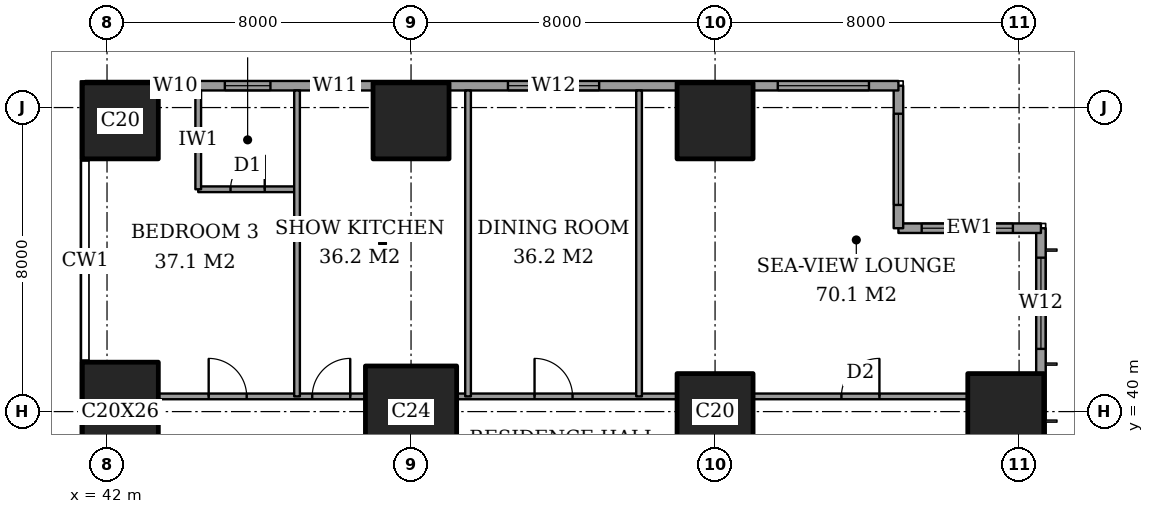
"""IFC4 building model, lengths in metres.
Left out: names, types, materials, properties, quantities, classifications, styles, units other than length and angle.
Written with IfcOpenShell. Run it as: python <this file> out.ifc"""

import sys

from ifc_helpers import new_model, si_unit, direction, frame, frame_2d, origin, origin_2d, place, context, subcontext, project, spatial, rectangle, extrude, element, fill, save


model = new_model("IFC4")
c1 = context("Model", 3, precision=1e-05, world=origin(), true_north=direction((0.0, 1.0)))
c2 = subcontext(c1, "Body", "Model", "MODEL_VIEW")
j1 = project(units=[si_unit("LENGTHUNIT", "METRE"), si_unit("PLANEANGLEUNIT", "RADIAN")], contexts=[c1])
p1 = place(None, origin())
s1 = spatial("IfcSite", under=j1, at=p1, CompositionType="ELEMENT")
p2 = place(p1, origin())
s2 = spatial("IfcBuilding", under=s1, at=p2, CompositionType="ELEMENT")
p3 = place(p2, frame((0.0, 0.0, 128.6)))
s3 = spatial("IfcBuildingStorey", under=s2, at=p3, CompositionType="ELEMENT", Elevation=128.6)
p4 = place(p3, frame((42.35, 40.0, 0.0), z_axis=(0.0, 0.0, 1.0), x_axis=(1.0, 0.0, 0.0)))
e1 = element("IfcColumn", 1, at=p4, inside=s3, PredefinedType="COLUMN", context=c2, shape_type="SweptSolid", body=[
    extrude(rectangle(XDim=2.0, YDim=2.6, at=origin_2d()), origin(), (0.0, 0.0, 1.0), 3.6),
])
p5 = place(p3, frame((42.35, 47.65, 0.0), z_axis=(0.0, 0.0, 1.0), x_axis=(1.0, 0.0, 0.0)))
e2 = element("IfcColumn", 2, at=p5, inside=s3, PredefinedType="COLUMN", context=c2, shape_type="SweptSolid", body=[
    extrude(rectangle(XDim=2.0, YDim=2.0, at=origin_2d()), origin(), (0.0, 0.0, 1.0), 3.6),
])
p6 = place(p3, frame((50.0, 40.0, 0.0), z_axis=(0.0, 0.0, 1.0), x_axis=(1.0, 0.0, 0.0)))
e3 = element("IfcColumn", 3, at=p6, inside=s3, PredefinedType="COLUMN", context=c2, shape_type="SweptSolid", body=[
    extrude(rectangle(XDim=2.4, YDim=2.4, at=origin_2d()), origin(), (0.0, 0.0, 1.0), 3.6),
])
for number, where, z_axis, x_axis in (
    (4, (50.0, 47.65, 0.0), (0.0, 0.0, 1.0), (1.0, 0.0, 0.0)),
    (5, (58.0, 40.0, 0.0), (0.0, 0.0, 1.0), (1.0, 0.0, 0.0)),
    (6, (58.0, 47.65, 0.0), (0.0, 0.0, 1.0), (1.0, 0.0, 0.0)),
    (7, (65.65, 40.0, 0.0), (0.0, 0.0, 1.0), (1.0, 0.0, 0.0)),
):
    element("IfcColumn", number, at=place(p3, frame(where, z_axis=z_axis, x_axis=x_axis)), inside=s3, PredefinedType="COLUMN", context=c2, shape_type="SweptSolid", body=[
        extrude(rectangle(XDim=2.0, YDim=2.0, at=origin_2d()), origin(), (0.0, 0.0, 1.0), 3.6),
    ])
p7 = place(p3, frame((66.575, 3.175, 0.0), z_axis=(0.0, 0.0, 1.0), x_axis=(0.0, 1.0, 0.0)))
e8 = element("IfcWall", 8, at=p7, inside=s3, PredefinedType="SOLIDWALL", context=c2, shape_type="SweptSolid", body=[
    extrude(rectangle(XDim=41.65, YDim=0.25, at=frame_2d((20.825, 0.0))), origin(), (0.0, 0.0, 1.0), 3.6),
])
p8 = place(p7, frame((0.775, 0.0, 0.4)))
e9 = element("IfcOpeningElement", 9, at=p8, cuts=e8, PredefinedType="OPENING", context=c2, shape_type="SweptSolid", body=[
    extrude(rectangle(XDim=2.4, YDim=2.2, at=frame_2d((1.2, 1.1))), frame((0.0, 0.135, 0.0), z_axis=(0.0, -1.0, 0.0), x_axis=(1.0, 0.0, 0.0)), (0.0, 0.0, 1.0), 0.27),
])
p9 = place(p7, frame((6.125, 0.0, 0.4)))
e10 = element("IfcOpeningElement", 10, at=p9, cuts=e8, PredefinedType="OPENING", context=c2, shape_type="SweptSolid", body=[
    extrude(rectangle(XDim=1.2, YDim=2.2, at=frame_2d((0.6, 1.1))), frame((0.0, 0.135, 0.0), z_axis=(0.0, -1.0, 0.0), x_axis=(1.0, 0.0, 0.0)), (0.0, 0.0, 1.0), 0.27),
])
p10 = place(p7, frame((8.375, 0.0, 0.4)))
e11 = element("IfcOpeningElement", 11, at=p10, cuts=e8, PredefinedType="OPENING", context=c2, shape_type="SweptSolid", body=[
    extrude(rectangle(XDim=2.4, YDim=2.2, at=frame_2d((1.2, 1.1))), frame((0.0, 0.135, 0.0), z_axis=(0.0, -1.0, 0.0), x_axis=(1.0, 0.0, 0.0)), (0.0, 0.0, 1.0), 0.27),
])
p11 = place(p7, frame((15.775, 0.0, 0.4)))
e12 = element("IfcOpeningElement", 12, at=p11, cuts=e8, PredefinedType="OPENING", context=c2, shape_type="SweptSolid", body=[
    extrude(rectangle(XDim=2.4, YDim=2.2, at=frame_2d((1.2, 1.1))), frame((0.0, 0.135, 0.0), z_axis=(0.0, -1.0, 0.0), x_axis=(1.0, 0.0, 0.0)), (0.0, 0.0, 1.0), 0.27),
])
p12 = place(p7, frame((23.475, 0.0, 0.4)))
e13 = element("IfcOpeningElement", 13, at=p12, cuts=e8, PredefinedType="OPENING", context=c2, shape_type="SweptSolid", body=[
    extrude(rectangle(XDim=2.4, YDim=2.2, at=frame_2d((1.2, 1.1))), frame((0.0, 0.135, 0.0), z_axis=(0.0, -1.0, 0.0), x_axis=(1.0, 0.0, 0.0)), (0.0, 0.0, 1.0), 0.27),
])
p13 = place(p7, frame((30.975, 0.0, 0.4)))
e14 = element("IfcOpeningElement", 14, at=p13, cuts=e8, PredefinedType="OPENING", context=c2, shape_type="SweptSolid", body=[
    extrude(rectangle(XDim=2.4, YDim=2.2, at=frame_2d((1.2, 1.1))), frame((0.0, 0.135, 0.0), z_axis=(0.0, -1.0, 0.0), x_axis=(1.0, 0.0, 0.0)), (0.0, 0.0, 1.0), 0.27),
])
p14 = place(p7, frame((34.5, 0.0, 0.4)))
e15 = element("IfcOpeningElement", 15, at=p14, cuts=e8, PredefinedType="OPENING", context=c2, shape_type="SweptSolid", body=[
    extrude(rectangle(XDim=1.2, YDim=2.2, at=frame_2d((0.6, 1.1))), frame((0.0, 0.135, 0.0), z_axis=(0.0, -1.0, 0.0), x_axis=(1.0, 0.0, 0.0)), (0.0, 0.0, 1.0), 0.27),
])
p15 = place(p7, frame((38.475, 0.0, 0.4)))
e16 = element("IfcOpeningElement", 16, at=p15, cuts=e8, PredefinedType="OPENING", context=c2, shape_type="SweptSolid", body=[
    extrude(rectangle(XDim=2.4, YDim=2.2, at=frame_2d((1.2, 1.1))), frame((0.0, 0.135, 0.0), z_axis=(0.0, -1.0, 0.0), x_axis=(1.0, 0.0, 0.0)), (0.0, 0.0, 1.0), 0.27),
])
p16 = place(p3, frame((66.575, 44.825, 0.0), z_axis=(0.0, 0.0, 1.0), x_axis=(-1.0, 0.0, 0.0)))
e17 = element("IfcWall", 17, at=p16, inside=s3, PredefinedType="SOLIDWALL", context=c2, shape_type="SweptSolid", body=[
    extrude(rectangle(XDim=3.75, YDim=0.25, at=frame_2d((1.875, 0.0))), origin(), (0.0, 0.0, 1.0), 3.6),
])
p17 = place(p16, frame((0.738, 0.0, 0.4)))
e18 = element("IfcOpeningElement", 18, at=p17, cuts=e17, PredefinedType="OPENING", context=c2, shape_type="SweptSolid", body=[
    extrude(rectangle(XDim=2.4, YDim=2.2, at=frame_2d((1.2, 1.1))), frame((0.0, 0.135, 0.0), z_axis=(0.0, -1.0, 0.0), x_axis=(1.0, 0.0, 0.0)), (0.0, 0.0, 1.0), 0.27),
])
p18 = place(p3, frame((62.825, 44.825, 0.0), z_axis=(0.0, 0.0, 1.0), x_axis=(0.0, 1.0, 0.0)))
e19 = element("IfcWall", 19, at=p18, inside=s3, PredefinedType="SOLIDWALL", context=c2, shape_type="SweptSolid", body=[
    extrude(rectangle(XDim=3.75, YDim=0.25, at=frame_2d((1.875, 0.0))), origin(), (0.0, 0.0, 1.0), 3.6),
])
p19 = place(p18, frame((0.613, 0.0, 0.4)))
e20 = element("IfcOpeningElement", 20, at=p19, cuts=e19, PredefinedType="OPENING", context=c2, shape_type="SweptSolid", body=[
    extrude(rectangle(XDim=2.4, YDim=2.2, at=frame_2d((1.2, 1.1))), frame((0.0, 0.135, 0.0), z_axis=(0.0, -1.0, 0.0), x_axis=(1.0, 0.0, 0.0)), (0.0, 0.0, 1.0), 0.27),
])
p20 = place(p3, frame((62.825, 48.575, 0.0), z_axis=(0.0, 0.0, 1.0), x_axis=(-1.0, 0.0, 0.0)))
e21 = element("IfcWall", 21, at=p20, inside=s3, PredefinedType="SOLIDWALL", context=c2, shape_type="SweptSolid", body=[
    extrude(rectangle(XDim=21.4, YDim=0.25, at=frame_2d((10.7, 0.0))), origin(), (0.0, 0.0, 1.0), 3.6),
])
p21 = place(p20, frame((0.775, 0.0, 0.4)))
e22 = element("IfcOpeningElement", 22, at=p21, cuts=e21, PredefinedType="OPENING", context=c2, shape_type="SweptSolid", body=[
    extrude(rectangle(XDim=2.4, YDim=2.2, at=frame_2d((1.2, 1.1))), frame((0.0, 0.135, 0.0), z_axis=(0.0, -1.0, 0.0), x_axis=(1.0, 0.0, 0.0)), (0.0, 0.0, 1.0), 0.27),
])
p22 = place(p20, frame((7.875, 0.0, 0.4)))
e23 = element("IfcOpeningElement", 23, at=p22, cuts=e21, PredefinedType="OPENING", context=c2, shape_type="SweptSolid", body=[
    extrude(rectangle(XDim=2.4, YDim=2.2, at=frame_2d((1.2, 1.1))), frame((0.0, 0.135, 0.0), z_axis=(0.0, -1.0, 0.0), x_axis=(1.0, 0.0, 0.0)), (0.0, 0.0, 1.0), 0.27),
])
p23 = place(p20, frame((14.225, 0.0, 0.4)))
e24 = element("IfcOpeningElement", 24, at=p23, cuts=e21, PredefinedType="OPENING", context=c2, shape_type="SweptSolid", body=[
    extrude(rectangle(XDim=1.2, YDim=2.2, at=frame_2d((0.6, 1.1))), frame((0.0, 0.135, 0.0), z_axis=(0.0, -1.0, 0.0), x_axis=(1.0, 0.0, 0.0)), (0.0, 0.0, 1.0), 0.27),
])
p24 = place(p20, frame((16.525, 0.0, 0.4)))
e25 = element("IfcOpeningElement", 25, at=p24, cuts=e21, PredefinedType="OPENING", context=c2, shape_type="SweptSolid", body=[
    extrude(rectangle(XDim=1.2, YDim=2.2, at=frame_2d((0.6, 1.1))), frame((0.0, 0.135, 0.0), z_axis=(0.0, -1.0, 0.0), x_axis=(1.0, 0.0, 0.0)), (0.0, 0.0, 1.0), 0.27),
])
p25 = place(p20, frame((18.725, 0.0, 0.4)))
e26 = element("IfcOpeningElement", 26, at=p25, cuts=e21, PredefinedType="OPENING", context=c2, shape_type="SweptSolid", body=[
    extrude(rectangle(XDim=0.6, YDim=2.2, at=frame_2d((0.3, 1.1))), frame((0.0, 0.135, 0.0), z_axis=(0.0, -1.0, 0.0), x_axis=(1.0, 0.0, 0.0)), (0.0, 0.0, 1.0), 0.27),
])
p26 = place(p3, frame((43.35, 40.4, 0.0), z_axis=(0.0, 0.0, 1.0), x_axis=(1.0, 0.0, 0.0)))
e27 = element("IfcWall", 27, at=p26, inside=s3, PredefinedType="PARTITIONING", context=c2, shape_type="SweptSolid", body=[
    extrude(rectangle(XDim=5.45, YDim=0.15, at=frame_2d((2.725, 0.0))), origin(), (0.0, 0.0, 1.0), 3.35),
])
p27 = place(p26, frame((4.05, 0.0, 0.0)))
e28 = element("IfcOpeningElement", 28, at=p27, cuts=e27, PredefinedType="OPENING", context=c2, shape_type="SweptSolid", body=[
    extrude(rectangle(XDim=1.0, YDim=2.1, at=frame_2d((0.5, 1.05))), frame((0.0, 0.085, 0.0), z_axis=(0.0, -1.0, 0.0), x_axis=(1.0, 0.0, 0.0)), (0.0, 0.0, 1.0), 0.17),
])
p28 = place(p26, frame((1.325, 0.0, 0.0)))
e29 = element("IfcOpeningElement", 29, at=p28, cuts=e27, PredefinedType="OPENING", context=c2, shape_type="SweptSolid", body=[
    extrude(rectangle(XDim=1.0, YDim=2.1, at=frame_2d((0.5, 1.05))), frame((0.0, 0.085, 0.0), z_axis=(0.0, -1.0, 0.0), x_axis=(1.0, 0.0, 0.0)), (0.0, 0.0, 1.0), 0.17),
])
p29 = place(p3, frame((51.2, 40.4, 0.0), z_axis=(0.0, 0.0, 1.0), x_axis=(1.0, 0.0, 0.0)))
e30 = element("IfcWall", 30, at=p29, inside=s3, PredefinedType="PARTITIONING", context=c2, shape_type="SweptSolid", body=[
    extrude(rectangle(XDim=5.8, YDim=0.15, at=frame_2d((2.9, 0.0))), origin(), (0.0, 0.0, 1.0), 3.35),
])
p30 = place(p29, frame((2.05, 0.0, 0.0)))
e31 = element("IfcOpeningElement", 31, at=p30, cuts=e30, PredefinedType="OPENING", context=c2, shape_type="SweptSolid", body=[
    extrude(rectangle(XDim=1.0, YDim=2.1, at=frame_2d((0.5, 1.05))), frame((0.0, 0.085, 0.0), z_axis=(0.0, -1.0, 0.0), x_axis=(1.0, 0.0, 0.0)), (0.0, 0.0, 1.0), 0.17),
])
p31 = place(p3, frame((59.0, 40.4, 0.0), z_axis=(0.0, 0.0, 1.0), x_axis=(1.0, 0.0, 0.0)))
e32 = element("IfcWall", 32, at=p31, inside=s3, PredefinedType="PARTITIONING", context=c2, shape_type="SweptSolid", body=[
    extrude(rectangle(XDim=5.65, YDim=0.15, at=frame_2d((2.825, 0.0))), origin(), (0.0, 0.0, 1.0), 3.35),
])
p32 = place(p31, frame((2.325, 0.0, 0.0)))
e33 = element("IfcOpeningElement", 33, at=p32, cuts=e32, PredefinedType="OPENING", context=c2, shape_type="SweptSolid", body=[
    extrude(rectangle(XDim=1.0, YDim=2.1, at=frame_2d((0.5, 1.05))), frame((0.0, 0.085, 0.0), z_axis=(0.0, -1.0, 0.0), x_axis=(1.0, 0.0, 0.0)), (0.0, 0.0, 1.0), 0.17),
])
p33 = place(p3, frame((44.4, 45.85, 0.0), z_axis=(0.0, 0.0, 1.0), x_axis=(1.0, 0.0, 0.0)))
e34 = element("IfcWall", 34, at=p33, inside=s3, PredefinedType="PARTITIONING", context=c2, shape_type="SweptSolid", body=[
    extrude(rectangle(XDim=2.6, YDim=0.15, at=frame_2d((1.3, 0.0))), origin(), (0.0, 0.0, 1.0), 3.35),
])
p34 = place(p33, frame((0.85, 0.0, 0.0)))
e35 = element("IfcOpeningElement", 35, at=p34, cuts=e34, PredefinedType="OPENING", context=c2, shape_type="SweptSolid", body=[
    extrude(rectangle(XDim=0.9, YDim=2.1, at=frame_2d((0.45, 1.05))), frame((0.0, 0.085, 0.0), z_axis=(0.0, -1.0, 0.0), x_axis=(1.0, 0.0, 0.0)), (0.0, 0.0, 1.0), 0.17),
])
p35 = place(p3, frame((44.4, 45.85, 0.0), z_axis=(0.0, 0.0, 1.0), x_axis=(0.0, 1.0, 0.0)))
e36 = element("IfcWall", 36, at=p35, inside=s3, PredefinedType="PARTITIONING", context=c2, shape_type="SweptSolid", body=[
    extrude(rectangle(XDim=2.6, YDim=0.15, at=frame_2d((1.3, 0.0))), origin(), (0.0, 0.0, 1.0), 3.35),
])
for number, where, z_axis, x_axis in (
    (37, (47.0, 40.4, 0.0), (0.0, 0.0, 1.0), (0.0, 1.0, 0.0)),
    (38, (51.5, 40.4, 0.0), (0.0, 0.0, 1.0), (0.0, 1.0, 0.0)),
    (39, (56.0, 40.4, 0.0), (0.0, 0.0, 1.0), (0.0, 1.0, 0.0)),
):
    element("IfcWall", number, at=place(p3, frame(where, z_axis=z_axis, x_axis=x_axis)), inside=s3, PredefinedType="PARTITIONING", context=c2, shape_type="SweptSolid", body=[
        extrude(rectangle(XDim=8.05, YDim=0.15, at=frame_2d((4.025, 0.0))), origin(), (0.0, 0.0, 1.0), 3.35),
    ])
p36 = place(p15, origin())
e40 = element("IfcWindow", 40, at=p36, inside=s3, PartitioningType="SINGLE_PANEL", PredefinedType="WINDOW", context=c2, shape_type="SweptSolid", body=[
    extrude(rectangle(XDim=2.4, YDim=2.2, at=frame_2d((1.2, 1.1))), frame((0.0, 0.03, 0.0), z_axis=(0.0, -1.0, 0.0), x_axis=(1.0, 0.0, 0.0)), (0.0, 0.0, 1.0), 0.06),
])
fill(e16, e40)
p37 = place(p17, origin())
e41 = element("IfcWindow", 41, at=p37, inside=s3, PartitioningType="SINGLE_PANEL", PredefinedType="WINDOW", context=c2, shape_type="SweptSolid", body=[
    extrude(rectangle(XDim=2.4, YDim=2.2, at=frame_2d((1.2, 1.1))), frame((0.0, 0.03, 0.0), z_axis=(0.0, -1.0, 0.0), x_axis=(1.0, 0.0, 0.0)), (0.0, 0.0, 1.0), 0.06),
])
fill(e18, e41)
p38 = place(p19, origin())
e42 = element("IfcWindow", 42, at=p38, inside=s3, PartitioningType="SINGLE_PANEL", PredefinedType="WINDOW", context=c2, shape_type="SweptSolid", body=[
    extrude(rectangle(XDim=2.4, YDim=2.2, at=frame_2d((1.2, 1.1))), frame((0.0, 0.03, 0.0), z_axis=(0.0, -1.0, 0.0), x_axis=(1.0, 0.0, 0.0)), (0.0, 0.0, 1.0), 0.06),
])
fill(e20, e42)
p39 = place(p21, origin())
e43 = element("IfcWindow", 43, at=p39, inside=s3, PartitioningType="SINGLE_PANEL", PredefinedType="WINDOW", context=c2, shape_type="SweptSolid", body=[
    extrude(rectangle(XDim=2.4, YDim=2.2, at=frame_2d((1.2, 1.1))), frame((0.0, 0.03, 0.0), z_axis=(0.0, -1.0, 0.0), x_axis=(1.0, 0.0, 0.0)), (0.0, 0.0, 1.0), 0.06),
])
fill(e22, e43)
p40 = place(p22, origin())
e44 = element("IfcWindow", 44, at=p40, inside=s3, PartitioningType="SINGLE_PANEL", PredefinedType="WINDOW", context=c2, shape_type="SweptSolid", body=[
    extrude(rectangle(XDim=2.4, YDim=2.2, at=frame_2d((1.2, 1.1))), frame((0.0, 0.03, 0.0), z_axis=(0.0, -1.0, 0.0), x_axis=(1.0, 0.0, 0.0)), (0.0, 0.0, 1.0), 0.06),
])
fill(e23, e44)
p41 = place(p23, origin())
e45 = element("IfcWindow", 45, at=p41, inside=s3, PartitioningType="SINGLE_PANEL", PredefinedType="WINDOW", context=c2, shape_type="SweptSolid", body=[
    extrude(rectangle(XDim=1.2, YDim=2.2, at=frame_2d((0.6, 1.1))), frame((0.0, 0.03, 0.0), z_axis=(0.0, -1.0, 0.0), x_axis=(1.0, 0.0, 0.0)), (0.0, 0.0, 1.0), 0.06),
])
fill(e24, e45)
p42 = place(p24, origin())
e46 = element("IfcWindow", 46, at=p42, inside=s3, PartitioningType="SINGLE_PANEL", PredefinedType="WINDOW", context=c2, shape_type="SweptSolid", body=[
    extrude(rectangle(XDim=1.2, YDim=2.2, at=frame_2d((0.6, 1.1))), frame((0.0, 0.03, 0.0), z_axis=(0.0, -1.0, 0.0), x_axis=(1.0, 0.0, 0.0)), (0.0, 0.0, 1.0), 0.06),
])
fill(e25, e46)
p43 = place(p25, origin())
e47 = element("IfcWindow", 47, at=p43, inside=s3, PartitioningType="SINGLE_PANEL", PredefinedType="WINDOW", context=c2, shape_type="SweptSolid", body=[
    extrude(rectangle(XDim=0.6, YDim=2.2, at=frame_2d((0.3, 1.1))), frame((0.0, 0.03, 0.0), z_axis=(0.0, -1.0, 0.0), x_axis=(1.0, 0.0, 0.0)), (0.0, 0.0, 1.0), 0.06),
])
fill(e26, e47)
p44 = place(p32, origin())
e48 = element("IfcDoor", 48, at=p44, inside=s3, OperationType="SINGLE_SWING_LEFT", PredefinedType="DOOR", context=c2, shape_type="SweptSolid", body=[
    extrude(rectangle(XDim=1.0, YDim=2.1, at=frame_2d((0.5, 1.05))), frame((0.0, 0.025, 0.0), z_axis=(0.0, -1.0, 0.0), x_axis=(1.0, 0.0, 0.0)), (0.0, 0.0, 1.0), 0.05),
])
fill(e33, e48)
p45 = place(p30, origin())
e49 = element("IfcDoor", 49, at=p45, inside=s3, OperationType="SINGLE_SWING_RIGHT", PredefinedType="DOOR", context=c2, shape_type="SweptSolid", body=[
    extrude(rectangle(XDim=1.0, YDim=2.1, at=frame_2d((0.5, 1.05))), frame((0.0, 0.025, 0.0), z_axis=(0.0, -1.0, 0.0), x_axis=(1.0, 0.0, 0.0)), (0.0, 0.0, 1.0), 0.05),
])
fill(e31, e49)
p46 = place(p27, origin())
e50 = element("IfcDoor", 50, at=p46, inside=s3, OperationType="SINGLE_SWING_LEFT", PredefinedType="DOOR", context=c2, shape_type="SweptSolid", body=[
    extrude(rectangle(XDim=1.0, YDim=2.1, at=frame_2d((0.5, 1.05))), frame((0.0, 0.025, 0.0), z_axis=(0.0, -1.0, 0.0), x_axis=(1.0, 0.0, 0.0)), (0.0, 0.0, 1.0), 0.05),
])
fill(e28, e50)
p47 = place(p34, origin())
e51 = element("IfcDoor", 51, at=p47, inside=s3, OperationType="SINGLE_SWING_LEFT", PredefinedType="DOOR", context=c2, shape_type="SweptSolid", body=[
    extrude(rectangle(XDim=0.9, YDim=2.1, at=frame_2d((0.45, 1.05))), frame((0.0, 0.025, 0.0), z_axis=(0.0, -1.0, 0.0), x_axis=(1.0, 0.0, 0.0)), (0.0, 0.0, 1.0), 0.05),
])
fill(e35, e51)
p48 = place(p28, origin())
e52 = element("IfcDoor", 52, at=p48, inside=s3, OperationType="SINGLE_SWING_RIGHT", PredefinedType="DOOR", context=c2, shape_type="SweptSolid", body=[
    extrude(rectangle(XDim=1.0, YDim=2.1, at=frame_2d((0.5, 1.05))), frame((0.0, 0.025, 0.0), z_axis=(0.0, -1.0, 0.0), x_axis=(1.0, 0.0, 0.0)), (0.0, 0.0, 1.0), 0.05),
])
fill(e29, e52)
save(model, sys.argv[1])
